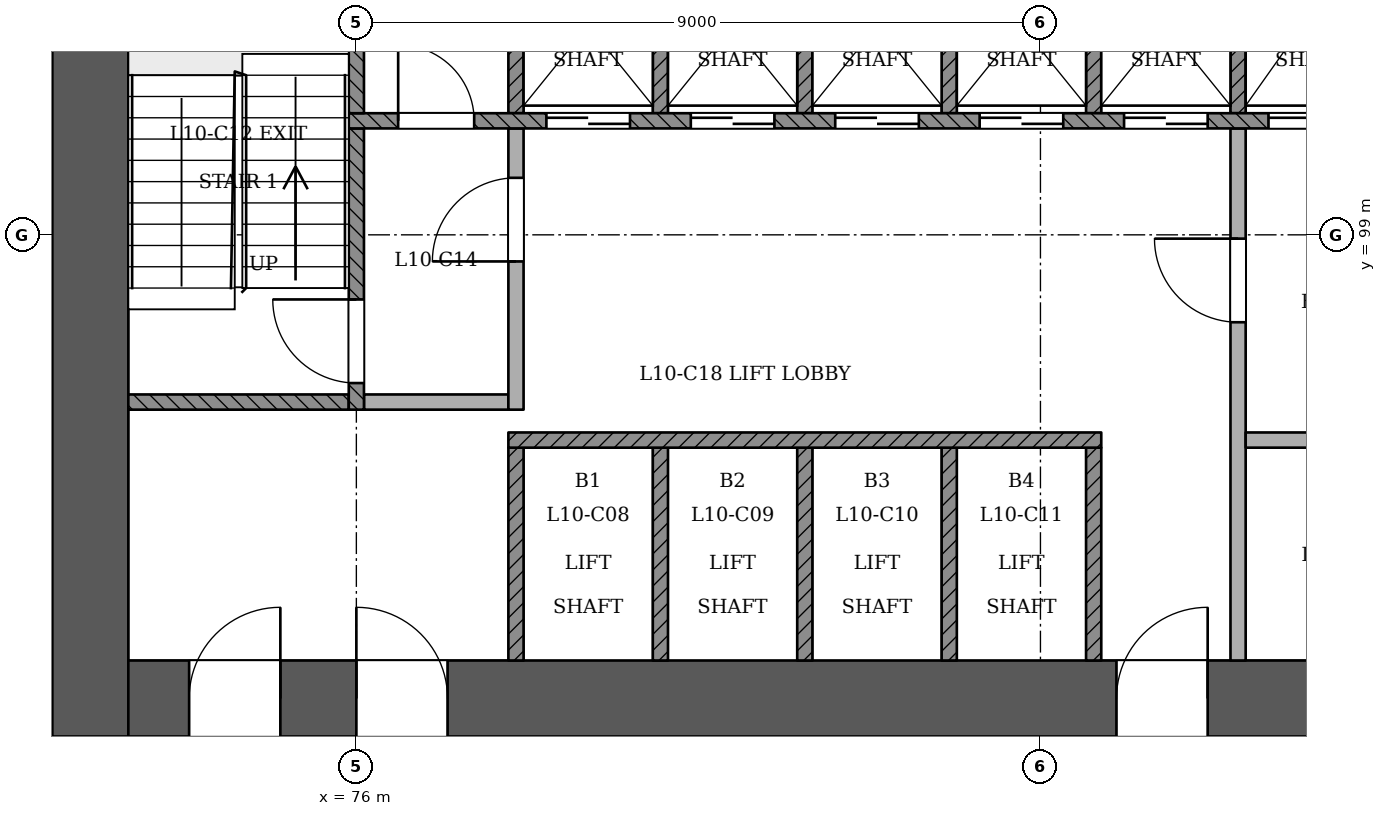
"""IFC4 building model, lengths in metres.
Left out: names, types, materials, properties, quantities, classifications, styles, units other than length and angle.
Written with IfcOpenShell. Run it as: python <this file> out.ifc"""

import sys

from ifc_helpers import new_model, si_unit, direction, frame, frame_2d, origin, place, context, subcontext, project, spatial, rectangle, extrude, element, fill, save


model = new_model("IFC4")
c1 = context("Model", 3, precision=1e-05, world=origin(), true_north=direction((0.0, 1.0)))
c2 = subcontext(c1, "Body", "Model", "MODEL_VIEW")
j1 = project(units=[si_unit("LENGTHUNIT", "METRE"), si_unit("PLANEANGLEUNIT", "RADIAN")], contexts=[c1])
p1 = place(None, origin())
s1 = spatial("IfcSite", under=j1, at=p1, CompositionType="ELEMENT")
p2 = place(p1, origin())
s2 = spatial("IfcBuilding", under=s1, at=p2, CompositionType="ELEMENT")
p3 = place(p2, frame((0.0, 0.0, 45.0)))
s3 = spatial("IfcBuildingStorey", under=s2, at=p3, CompositionType="ELEMENT", Elevation=45.0)
p4 = place(p3, frame((72.5, 92.9, 0.0), z_axis=(0.0, 0.0, 1.0), x_axis=(1.0, 0.0, 0.0)))
e1 = element("IfcWall", 1, at=p4, inside=s3, PredefinedType="SHEAR", context=c2, shape_type="SweptSolid", body=[
    extrude(rectangle(XDim=25.5, YDim=1.0, at=frame_2d((12.75, 0.0))), origin(), (0.0, 0.0, 1.0), 3.6),
])
p5 = place(p4, frame((1.3, 0.0, 0.0)))
e2 = element("IfcOpeningElement", 2, at=p5, cuts=e1, PredefinedType="OPENING", context=c2, shape_type="SweptSolid", body=[
    extrude(rectangle(XDim=1.2, YDim=2.1, at=frame_2d((0.6, 1.05))), frame((0.0, 0.51, 0.0), z_axis=(0.0, -1.0, 0.0), x_axis=(1.0, 0.0, 0.0)), (0.0, 0.0, 1.0), 1.021),
])
p6 = place(p4, frame((3.5, 0.0, 0.0)))
e3 = element("IfcOpeningElement", 3, at=p6, cuts=e1, PredefinedType="OPENING", context=c2, shape_type="SweptSolid", body=[
    extrude(rectangle(XDim=1.2, YDim=2.1, at=frame_2d((0.6, 1.05))), frame((0.0, 0.51, 0.0), z_axis=(0.0, -1.0, 0.0), x_axis=(1.0, 0.0, 0.0)), (0.0, 0.0, 1.0), 1.021),
])
p7 = place(p4, frame((13.5, 0.0, 0.0)))
e4 = element("IfcOpeningElement", 4, at=p7, cuts=e1, PredefinedType="OPENING", context=c2, shape_type="SweptSolid", body=[
    extrude(rectangle(XDim=1.2, YDim=2.1, at=frame_2d((0.6, 1.05))), frame((0.0, 0.51, 0.0), z_axis=(0.0, -1.0, 0.0), x_axis=(1.0, 0.0, 0.0)), (0.0, 0.0, 1.0), 1.021),
])
p8 = place(p4, frame((16.913, 0.0, 0.0)))
e5 = element("IfcOpeningElement", 5, at=p8, cuts=e1, PredefinedType="OPENING", context=c2, shape_type="SweptSolid", body=[
    extrude(rectangle(XDim=1.0, YDim=2.1, at=frame_2d((0.5, 1.05))), frame((0.0, 0.51, 0.0), z_axis=(0.0, -1.0, 0.0), x_axis=(1.0, 0.0, 0.0)), (0.0, 0.0, 1.0), 1.021),
])
p9 = place(p4, frame((20.8, 0.0, 0.0)))
e6 = element("IfcOpeningElement", 6, at=p9, cuts=e1, PredefinedType="OPENING", context=c2, shape_type="SweptSolid", body=[
    extrude(rectangle(XDim=1.0, YDim=2.1, at=frame_2d((0.5, 1.05))), frame((0.0, 0.51, 0.0), z_axis=(0.0, -1.0, 0.0), x_axis=(1.0, 0.0, 0.0)), (0.0, 0.0, 1.0), 1.021),
])
p10 = place(p4, frame((23.238, 0.0, 0.0)))
e7 = element("IfcOpeningElement", 7, at=p10, cuts=e1, PredefinedType="OPENING", context=c2, shape_type="SweptSolid", body=[
    extrude(rectangle(XDim=1.0, YDim=2.1, at=frame_2d((0.5, 1.05))), frame((0.0, 0.51, 0.0), z_axis=(0.0, -1.0, 0.0), x_axis=(1.0, 0.0, 0.0)), (0.0, 0.0, 1.0), 1.021),
])
p11 = place(p3, frame((72.5, 103.9, 0.0), z_axis=(0.0, 0.0, 1.0), x_axis=(0.0, -1.0, 0.0)))
e8 = element("IfcWall", 8, at=p11, inside=s3, PredefinedType="SHEAR", context=c2, shape_type="SweptSolid", body=[
    extrude(rectangle(XDim=11.5, YDim=1.0, at=frame_2d((5.75, 0.0))), origin(), (0.0, 0.0, 1.0), 3.6),
])
p12 = place(p3, frame((61.853, 96.477, 0.0), z_axis=(0.0, 0.0, 1.0), x_axis=(0.500000327816, -0.86602521452, 0.0)))
e9 = element("IfcWall", 9, at=p12, inside=s3, PredefinedType="PARTITIONING", context=c2, shape_type="SweptSolid", body=[
    extrude(rectangle(XDim=39.979, YDim=0.15, at=frame_2d((19.99, 0.0))), origin(), (0.0, 0.0, 1.0), 2.7),
])
p13 = place(p12, frame((1.49, 0.0, 0.0)))
e10 = element("IfcOpeningElement", 10, at=p13, cuts=e9, PredefinedType="OPENING", context=c2, shape_type="SweptSolid", body=[
    extrude(rectangle(XDim=1.0, YDim=2.1, at=frame_2d((0.5, 1.05))), frame((0.0, 0.085, 0.0), z_axis=(0.0, -1.0, 0.0), x_axis=(1.0, 0.0, 0.0)), (0.0, 0.0, 1.0), 0.171),
])
p14 = place(p12, frame((4.55, 0.0, 0.0)))
e11 = element("IfcOpeningElement", 11, at=p14, cuts=e9, PredefinedType="OPENING", context=c2, shape_type="SweptSolid", body=[
    extrude(rectangle(XDim=1.1, YDim=2.1, at=frame_2d((0.55, 1.05))), frame((0.0, 0.085, 0.0), z_axis=(0.0, -1.0, 0.0), x_axis=(1.0, 0.0, 0.0)), (0.0, 0.0, 1.0), 0.171),
])
p15 = place(p12, frame((11.259, 0.0, 0.0)))
e12 = element("IfcOpeningElement", 12, at=p15, cuts=e9, PredefinedType="OPENING", context=c2, shape_type="SweptSolid", body=[
    extrude(rectangle(XDim=1.0, YDim=2.1, at=frame_2d((0.5, 1.05))), frame((0.0, 0.085, 0.0), z_axis=(0.0, -1.0, 0.0), x_axis=(1.0, 0.0, 0.0)), (0.0, 0.0, 1.0), 0.171),
])
p16 = place(p12, frame((17.979, 0.0, 0.0)))
e13 = element("IfcOpeningElement", 13, at=p16, cuts=e9, PredefinedType="OPENING", context=c2, shape_type="SweptSolid", body=[
    extrude(rectangle(XDim=1.2, YDim=2.1, at=frame_2d((0.6, 1.05))), frame((0.0, 0.085, 0.0), z_axis=(0.0, -1.0, 0.0), x_axis=(1.0, 0.0, 0.0)), (0.0, 0.0, 1.0), 0.171),
])
p17 = place(p12, frame((22.699, 0.0, 0.0)))
e14 = element("IfcOpeningElement", 14, at=p17, cuts=e9, PredefinedType="OPENING", context=c2, shape_type="SweptSolid", body=[
    extrude(rectangle(XDim=1.0, YDim=2.1, at=frame_2d((0.5, 1.05))), frame((0.0, 0.085, 0.0), z_axis=(0.0, -1.0, 0.0), x_axis=(1.0, 0.0, 0.0)), (0.0, 0.0, 1.0), 0.171),
])
p18 = place(p12, frame((29.374, 0.0, 0.0)))
e15 = element("IfcOpeningElement", 15, at=p18, cuts=e9, PredefinedType="OPENING", context=c2, shape_type="SweptSolid", body=[
    extrude(rectangle(XDim=1.0, YDim=2.1, at=frame_2d((0.5, 1.05))), frame((0.0, 0.085, 0.0), z_axis=(0.0, -1.0, 0.0), x_axis=(1.0, 0.0, 0.0)), (0.0, 0.0, 1.0), 0.171),
])
p19 = place(p12, frame((31.584, 0.0, 0.0)))
e16 = element("IfcOpeningElement", 16, at=p19, cuts=e9, PredefinedType="OPENING", context=c2, shape_type="SweptSolid", body=[
    extrude(rectangle(XDim=1.0, YDim=2.1, at=frame_2d((0.5, 1.05))), frame((0.0, 0.085, 0.0), z_axis=(0.0, -1.0, 0.0), x_axis=(1.0, 0.0, 0.0)), (0.0, 0.0, 1.0), 0.171),
])
p20 = place(p12, frame((38.374, 0.0, 0.0)))
e17 = element("IfcOpeningElement", 17, at=p20, cuts=e9, PredefinedType="OPENING", context=c2, shape_type="SweptSolid", body=[
    extrude(rectangle(XDim=1.0, YDim=2.1, at=frame_2d((0.5, 1.05))), frame((0.0, 0.085, 0.0), z_axis=(0.0, -1.0, 0.0), x_axis=(1.0, 0.0, 0.0)), (0.0, 0.0, 1.0), 0.171),
])
for number, where, z_axis, x_axis in (
    (18, (78.1, 93.4, 0.0), (0.0, 0.0, 1.0), (0.0, 1.0, 0.0)),
    (19, (80.0, 93.4, 0.0), (0.0, 0.0, 1.0), (0.0, 1.0, 0.0)),
    (20, (81.9, 93.4, 0.0), (0.0, 0.0, 1.0), (0.0, 1.0, 0.0)),
    (21, (83.8, 93.4, 0.0), (0.0, 0.0, 1.0), (0.0, 1.0, 0.0)),
    (22, (85.7, 93.4, 0.0), (0.0, 0.0, 1.0), (0.0, 1.0, 0.0)),
):
    element("IfcWall", number, at=place(p3, frame(where, z_axis=z_axis, x_axis=x_axis)), inside=s3, PredefinedType="SOLIDWALL", context=c2, shape_type="SweptSolid", body=[
        extrude(rectangle(XDim=2.8, YDim=0.2, at=frame_2d((1.4, 0.0))), origin(), (0.0, 0.0, 1.0), 3.1),
    ])
p21 = place(p3, frame((87.6, 93.4, 0.0), z_axis=(0.0, 0.0, 1.0), x_axis=(0.0, 1.0, 0.0)))
e23 = element("IfcWall", 23, at=p21, inside=s3, PredefinedType="PARTITIONING", context=c2, shape_type="SweptSolid", body=[
    extrude(rectangle(XDim=7.0, YDim=0.2, at=frame_2d((3.5, 0.0))), origin(), (0.0, 0.0, 1.0), 3.1),
])
p22 = place(p21, frame((4.45, 0.0, 0.0)))
e24 = element("IfcOpeningElement", 24, at=p22, cuts=e23, PredefinedType="OPENING", context=c2, shape_type="SweptSolid", body=[
    extrude(rectangle(XDim=1.1, YDim=2.1, at=frame_2d((0.55, 1.05))), frame((0.0, 0.11, 0.0), z_axis=(0.0, -1.0, 0.0), x_axis=(1.0, 0.0, 0.0)), (0.0, 0.0, 1.0), 0.221),
])
p23 = place(p3, frame((78.0, 96.3, 0.0), z_axis=(0.0, 0.0, 1.0), x_axis=(1.0, 0.0, 0.0)))
e25 = element("IfcWall", 25, at=p23, inside=s3, PredefinedType="SOLIDWALL", context=c2, shape_type="SweptSolid", body=[
    extrude(rectangle(XDim=7.8, YDim=0.2, at=frame_2d((3.9, 0.0))), origin(), (0.0, 0.0, 1.0), 3.1),
])
p24 = place(p3, frame((87.7, 96.3, 0.0), z_axis=(0.0, 0.0, 1.0), x_axis=(1.0, 0.0, 0.0)))
e26 = element("IfcWall", 26, at=p24, inside=s3, PredefinedType="PARTITIONING", context=c2, shape_type="SweptSolid", body=[
    extrude(rectangle(XDim=3.6, YDim=0.2, at=frame_2d((1.8, 0.0))), origin(), (0.0, 0.0, 1.0), 3.1),
])
p25 = place(p3, frame((73.0, 96.8, 0.0), z_axis=(0.0, 0.0, 1.0), x_axis=(1.0, 0.0, 0.0)))
e27 = element("IfcWall", 27, at=p25, inside=s3, PredefinedType="SOLIDWALL", context=c2, shape_type="SweptSolid", body=[
    extrude(rectangle(XDim=2.9, YDim=0.2, at=frame_2d((1.45, 0.0))), origin(), (0.0, 0.0, 1.0), 3.1),
])
p26 = place(p3, frame((76.0, 96.7, 0.0), z_axis=(0.0, 0.0, 1.0), x_axis=(0.0, 1.0, 0.0)))
e28 = element("IfcWall", 28, at=p26, inside=s3, PredefinedType="SOLIDWALL", context=c2, shape_type="SweptSolid", body=[
    extrude(rectangle(XDim=3.7, YDim=0.2, at=frame_2d((1.85, 0.0))), origin(), (0.0, 0.0, 1.0), 3.1),
])
p27 = place(p26, frame((0.35, 0.0, 0.0)))
e29 = element("IfcOpeningElement", 29, at=p27, cuts=e28, PredefinedType="OPENING", context=c2, shape_type="SweptSolid", body=[
    extrude(rectangle(XDim=1.1, YDim=2.1, at=frame_2d((0.55, 1.05))), frame((0.0, 0.11, 0.0), z_axis=(0.0, -1.0, 0.0), x_axis=(1.0, 0.0, 0.0)), (0.0, 0.0, 1.0), 0.221),
])
p28 = place(p3, frame((76.1, 96.8, 0.0), z_axis=(0.0, 0.0, 1.0), x_axis=(1.0, 0.0, 0.0)))
e30 = element("IfcWall", 30, at=p28, inside=s3, PredefinedType="PARTITIONING", context=c2, shape_type="SweptSolid", body=[
    extrude(rectangle(XDim=1.9, YDim=0.2, at=frame_2d((0.95, 0.0))), origin(), (0.0, 0.0, 1.0), 3.1),
])
p29 = place(p3, frame((78.1, 96.7, 0.0), z_axis=(0.0, 0.0, 1.0), x_axis=(0.0, 1.0, 0.0)))
e31 = element("IfcWall", 31, at=p29, inside=s3, PredefinedType="PARTITIONING", context=c2, shape_type="SweptSolid", body=[
    extrude(rectangle(XDim=3.7, YDim=0.2, at=frame_2d((1.85, 0.0))), origin(), (0.0, 0.0, 1.0), 3.1),
])
p30 = place(p29, frame((1.95, 0.0, 0.0)))
e32 = element("IfcOpeningElement", 32, at=p30, cuts=e31, PredefinedType="OPENING", context=c2, shape_type="SweptSolid", body=[
    extrude(rectangle(XDim=1.1, YDim=2.1, at=frame_2d((0.55, 1.05))), frame((0.0, 0.11, 0.0), z_axis=(0.0, -1.0, 0.0), x_axis=(1.0, 0.0, 0.0)), (0.0, 0.0, 1.0), 0.221),
])
p31 = place(p3, frame((75.9, 100.5, 0.0), z_axis=(0.0, 0.0, 1.0), x_axis=(1.0, 0.0, 0.0)))
e33 = element("IfcWall", 33, at=p31, inside=s3, PredefinedType="SOLIDWALL", context=c2, shape_type="SweptSolid", body=[
    extrude(rectangle(XDim=18.2, YDim=0.2, at=frame_2d((9.1, 0.0))), origin(), (0.0, 0.0, 1.0), 3.1),
])
p32 = place(p31, frame((2.6, 0.0, 0.0)))
e34 = element("IfcOpeningElement", 34, at=p32, cuts=e33, PredefinedType="OPENING", context=c2, shape_type="SweptSolid", body=[
    extrude(rectangle(XDim=1.1, YDim=2.1, at=frame_2d((0.55, 1.05))), frame((0.0, 0.11, 0.0), z_axis=(0.0, -1.0, 0.0), x_axis=(1.0, 0.0, 0.0)), (0.0, 0.0, 1.0), 0.221),
])
p33 = place(p31, frame((4.5, 0.0, 0.0)))
e35 = element("IfcOpeningElement", 35, at=p33, cuts=e33, PredefinedType="OPENING", context=c2, shape_type="SweptSolid", body=[
    extrude(rectangle(XDim=1.1, YDim=2.1, at=frame_2d((0.55, 1.05))), frame((0.0, 0.11, 0.0), z_axis=(0.0, -1.0, 0.0), x_axis=(1.0, 0.0, 0.0)), (0.0, 0.0, 1.0), 0.221),
])
p34 = place(p31, frame((6.4, 0.0, 0.0)))
e36 = element("IfcOpeningElement", 36, at=p34, cuts=e33, PredefinedType="OPENING", context=c2, shape_type="SweptSolid", body=[
    extrude(rectangle(XDim=1.1, YDim=2.1, at=frame_2d((0.55, 1.05))), frame((0.0, 0.11, 0.0), z_axis=(0.0, -1.0, 0.0), x_axis=(1.0, 0.0, 0.0)), (0.0, 0.0, 1.0), 0.221),
])
p35 = place(p31, frame((8.3, 0.0, 0.0)))
e37 = element("IfcOpeningElement", 37, at=p35, cuts=e33, PredefinedType="OPENING", context=c2, shape_type="SweptSolid", body=[
    extrude(rectangle(XDim=1.1, YDim=2.1, at=frame_2d((0.55, 1.05))), frame((0.0, 0.11, 0.0), z_axis=(0.0, -1.0, 0.0), x_axis=(1.0, 0.0, 0.0)), (0.0, 0.0, 1.0), 0.221),
])
p36 = place(p31, frame((10.2, 0.0, 0.0)))
e38 = element("IfcOpeningElement", 38, at=p36, cuts=e33, PredefinedType="OPENING", context=c2, shape_type="SweptSolid", body=[
    extrude(rectangle(XDim=1.1, YDim=2.1, at=frame_2d((0.55, 1.05))), frame((0.0, 0.11, 0.0), z_axis=(0.0, -1.0, 0.0), x_axis=(1.0, 0.0, 0.0)), (0.0, 0.0, 1.0), 0.221),
])
p37 = place(p31, frame((12.1, 0.0, 0.0)))
e39 = element("IfcOpeningElement", 39, at=p37, cuts=e33, PredefinedType="OPENING", context=c2, shape_type="SweptSolid", body=[
    extrude(rectangle(XDim=1.1, YDim=2.1, at=frame_2d((0.55, 1.05))), frame((0.0, 0.11, 0.0), z_axis=(0.0, -1.0, 0.0), x_axis=(1.0, 0.0, 0.0)), (0.0, 0.0, 1.0), 0.221),
])
p38 = place(p31, frame((14.0, 0.0, 0.0)))
e40 = element("IfcOpeningElement", 40, at=p38, cuts=e33, PredefinedType="OPENING", context=c2, shape_type="SweptSolid", body=[
    extrude(rectangle(XDim=1.1, YDim=2.1, at=frame_2d((0.55, 1.05))), frame((0.0, 0.11, 0.0), z_axis=(0.0, -1.0, 0.0), x_axis=(1.0, 0.0, 0.0)), (0.0, 0.0, 1.0), 0.221),
])
p39 = place(p31, frame((0.65, 0.0, 0.0)))
e41 = element("IfcOpeningElement", 41, at=p39, cuts=e33, PredefinedType="OPENING", context=c2, shape_type="SweptSolid", body=[
    extrude(rectangle(XDim=1.0, YDim=2.1, at=frame_2d((0.5, 1.05))), frame((0.0, 0.11, 0.0), z_axis=(0.0, -1.0, 0.0), x_axis=(1.0, 0.0, 0.0)), (0.0, 0.0, 1.0), 0.221),
])
p40 = place(p31, frame((16.3, 0.0, 0.0)))
e42 = element("IfcOpeningElement", 42, at=p40, cuts=e33, PredefinedType="OPENING", context=c2, shape_type="SweptSolid", body=[
    extrude(rectangle(XDim=1.0, YDim=2.1, at=frame_2d((0.5, 1.05))), frame((0.0, 0.11, 0.0), z_axis=(0.0, -1.0, 0.0), x_axis=(1.0, 0.0, 0.0)), (0.0, 0.0, 1.0), 0.221),
])
for number, where, z_axis, x_axis in (
    (43, (76.0, 100.6, 0.0), (0.0, 0.0, 1.0), (0.0, 1.0, 0.0)),
    (44, (78.1, 100.6, 0.0), (0.0, 0.0, 1.0), (0.0, 1.0, 0.0)),
    (45, (80.0, 100.6, 0.0), (0.0, 0.0, 1.0), (0.0, 1.0, 0.0)),
    (46, (81.9, 100.6, 0.0), (0.0, 0.0, 1.0), (0.0, 1.0, 0.0)),
    (47, (83.8, 100.6, 0.0), (0.0, 0.0, 1.0), (0.0, 1.0, 0.0)),
    (48, (85.7, 100.6, 0.0), (0.0, 0.0, 1.0), (0.0, 1.0, 0.0)),
    (49, (87.6, 100.6, 0.0), (0.0, 0.0, 1.0), (0.0, 1.0, 0.0)),
):
    element("IfcWall", number, at=place(p3, frame(where, z_axis=z_axis, x_axis=x_axis)), inside=s3, PredefinedType="SOLIDWALL", context=c2, shape_type="SweptSolid", body=[
        extrude(rectangle(XDim=2.8, YDim=0.2, at=frame_2d((1.4, 0.0))), origin(), (0.0, 0.0, 1.0), 3.1),
    ])
p41 = place(p32, origin())
e50 = element("IfcDoor", 50, at=p41, inside=s3, OperationType="SLIDING_TO_RIGHT", PredefinedType="NOTDEFINED", context=c2, shape_type="SweptSolid", body=[
    extrude(rectangle(XDim=1.1, YDim=2.1, at=frame_2d((0.55, 1.05))), frame((0.0, 0.025, 0.0), z_axis=(0.0, -1.0, 0.0), x_axis=(1.0, 0.0, 0.0)), (0.0, 0.0, 1.0), 0.05),
])
fill(e34, e50)
p42 = place(p33, origin())
e51 = element("IfcDoor", 51, at=p42, inside=s3, OperationType="SLIDING_TO_LEFT", PredefinedType="NOTDEFINED", context=c2, shape_type="SweptSolid", body=[
    extrude(rectangle(XDim=1.1, YDim=2.1, at=frame_2d((0.55, 1.05))), frame((0.0, 0.025, 0.0), z_axis=(0.0, -1.0, 0.0), x_axis=(1.0, 0.0, 0.0)), (0.0, 0.0, 1.0), 0.05),
])
fill(e35, e51)
p43 = place(p34, origin())
e52 = element("IfcDoor", 52, at=p43, inside=s3, OperationType="SLIDING_TO_RIGHT", PredefinedType="NOTDEFINED", context=c2, shape_type="SweptSolid", body=[
    extrude(rectangle(XDim=1.1, YDim=2.1, at=frame_2d((0.55, 1.05))), frame((0.0, 0.025, 0.0), z_axis=(0.0, -1.0, 0.0), x_axis=(1.0, 0.0, 0.0)), (0.0, 0.0, 1.0), 0.05),
])
fill(e36, e52)
p44 = place(p35, origin())
e53 = element("IfcDoor", 53, at=p44, inside=s3, OperationType="SLIDING_TO_LEFT", PredefinedType="NOTDEFINED", context=c2, shape_type="SweptSolid", body=[
    extrude(rectangle(XDim=1.1, YDim=2.1, at=frame_2d((0.55, 1.05))), frame((0.0, 0.025, 0.0), z_axis=(0.0, -1.0, 0.0), x_axis=(1.0, 0.0, 0.0)), (0.0, 0.0, 1.0), 0.05),
])
fill(e37, e53)
p45 = place(p36, origin())
e54 = element("IfcDoor", 54, at=p45, inside=s3, OperationType="SLIDING_TO_RIGHT", PredefinedType="NOTDEFINED", context=c2, shape_type="SweptSolid", body=[
    extrude(rectangle(XDim=1.1, YDim=2.1, at=frame_2d((0.55, 1.05))), frame((0.0, 0.025, 0.0), z_axis=(0.0, -1.0, 0.0), x_axis=(1.0, 0.0, 0.0)), (0.0, 0.0, 1.0), 0.05),
])
fill(e38, e54)
p46 = place(p37, origin())
e55 = element("IfcDoor", 55, at=p46, inside=s3, OperationType="SLIDING_TO_RIGHT", PredefinedType="NOTDEFINED", context=c2, shape_type="SweptSolid", body=[
    extrude(rectangle(XDim=1.1, YDim=2.1, at=frame_2d((0.55, 1.05))), frame((0.0, 0.025, 0.0), z_axis=(0.0, -1.0, 0.0), x_axis=(1.0, 0.0, 0.0)), (0.0, 0.0, 1.0), 0.05),
])
fill(e39, e55)
p47 = place(p27, origin())
e56 = element("IfcDoor", 56, at=p47, inside=s3, OperationType="SINGLE_SWING_RIGHT", PredefinedType="NOTDEFINED", context=c2, shape_type="SweptSolid", body=[
    extrude(rectangle(XDim=1.1, YDim=2.1, at=frame_2d((0.55, 1.05))), frame((0.0, 0.025, 0.0), z_axis=(0.0, -1.0, 0.0), x_axis=(1.0, 0.0, 0.0)), (0.0, 0.0, 1.0), 0.05),
])
fill(e29, e56)
p48 = place(p30, origin())
e57 = element("IfcDoor", 57, at=p48, inside=s3, OperationType="SINGLE_SWING_LEFT", PredefinedType="NOTDEFINED", context=c2, shape_type="SweptSolid", body=[
    extrude(rectangle(XDim=1.1, YDim=2.1, at=frame_2d((0.55, 1.05))), frame((0.0, 0.025, 0.0), z_axis=(0.0, -1.0, 0.0), x_axis=(1.0, 0.0, 0.0)), (0.0, 0.0, 1.0), 0.05),
])
fill(e32, e57)
p49 = place(p22, origin())
e58 = element("IfcDoor", 58, at=p49, inside=s3, OperationType="SINGLE_SWING_RIGHT", PredefinedType="NOTDEFINED", context=c2, shape_type="SweptSolid", body=[
    extrude(rectangle(XDim=1.1, YDim=2.1, at=frame_2d((0.55, 1.05))), frame((0.0, 0.025, 0.0), z_axis=(0.0, -1.0, 0.0), x_axis=(1.0, 0.0, 0.0)), (0.0, 0.0, 1.0), 0.05),
])
fill(e24, e58)
p50 = place(p5, origin())
e59 = element("IfcDoor", 59, at=p50, inside=s3, OperationType="SINGLE_SWING_RIGHT", PredefinedType="NOTDEFINED", context=c2, shape_type="SweptSolid", body=[
    extrude(rectangle(XDim=1.2, YDim=2.1, at=frame_2d((0.6, 1.05))), frame((0.0, 0.025, 0.0), z_axis=(0.0, -1.0, 0.0), x_axis=(1.0, 0.0, 0.0)), (0.0, 0.0, 1.0), 0.05),
])
fill(e2, e59)
p51 = place(p6, origin())
e60 = element("IfcDoor", 60, at=p51, inside=s3, OperationType="SINGLE_SWING_LEFT", PredefinedType="NOTDEFINED", context=c2, shape_type="SweptSolid", body=[
    extrude(rectangle(XDim=1.2, YDim=2.1, at=frame_2d((0.6, 1.05))), frame((0.0, 0.025, 0.0), z_axis=(0.0, -1.0, 0.0), x_axis=(1.0, 0.0, 0.0)), (0.0, 0.0, 1.0), 0.05),
])
fill(e3, e60)
p52 = place(p7, origin())
e61 = element("IfcDoor", 61, at=p52, inside=s3, OperationType="SINGLE_SWING_RIGHT", PredefinedType="NOTDEFINED", context=c2, shape_type="SweptSolid", body=[
    extrude(rectangle(XDim=1.2, YDim=2.1, at=frame_2d((0.6, 1.05))), frame((0.0, 0.025, 0.0), z_axis=(0.0, -1.0, 0.0), x_axis=(1.0, 0.0, 0.0)), (0.0, 0.0, 1.0), 0.05),
])
fill(e4, e61)
p53 = place(p39, origin())
e62 = element("IfcDoor", 62, at=p53, inside=s3, OperationType="SINGLE_SWING_LEFT", PredefinedType="NOTDEFINED", context=c2, shape_type="SweptSolid", body=[
    extrude(rectangle(XDim=1.0, YDim=2.1, at=frame_2d((0.5, 1.05))), frame((0.0, 0.025, 0.0), z_axis=(0.0, -1.0, 0.0), x_axis=(1.0, 0.0, 0.0)), (0.0, 0.0, 1.0), 0.05),
])
fill(e41, e62)
save(model, sys.argv[1])
